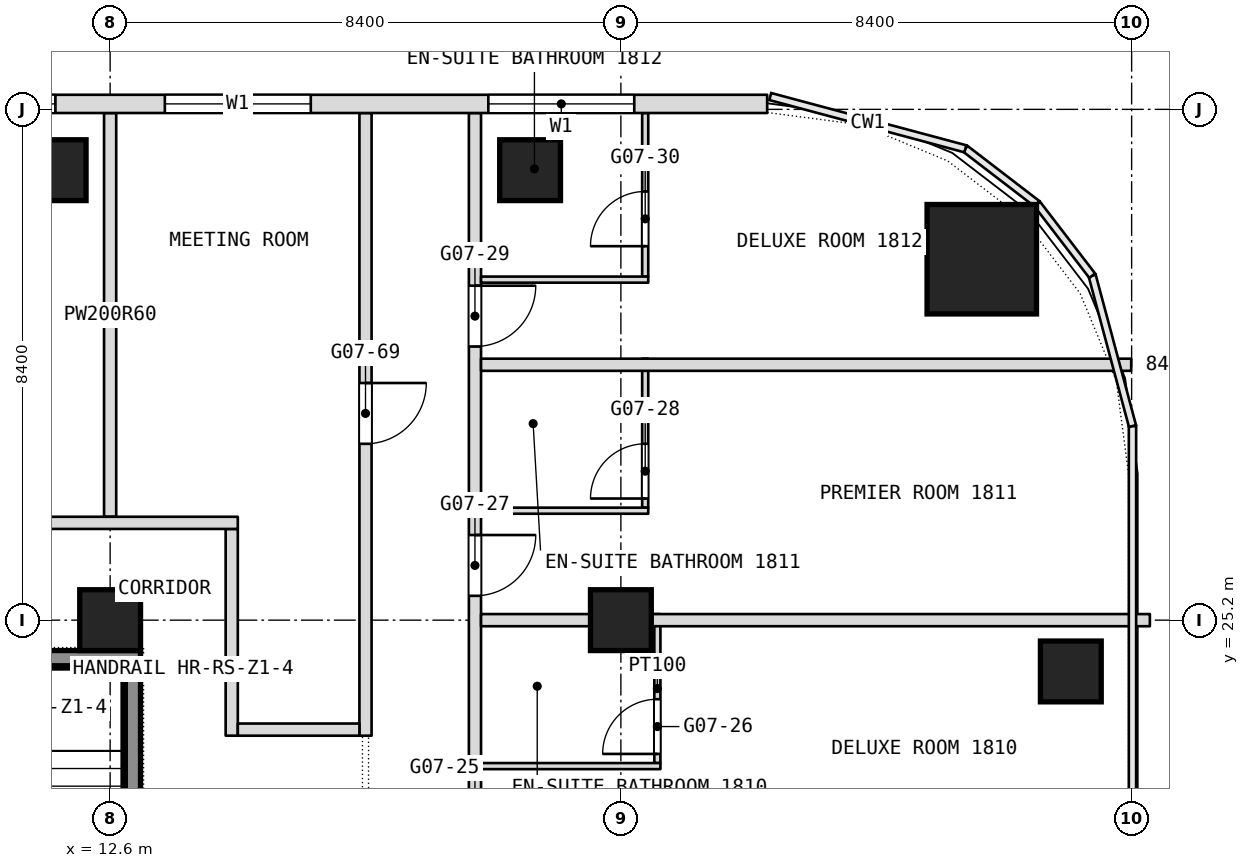
"""IFC4 building model, lengths in metres.
Left out: names, types, materials, properties, quantities, classifications, styles, units other than length and angle.
Written with IfcOpenShell. Run it as: python <this file> out.ifc"""

import sys

from ifc_helpers import new_model, si_unit, direction, frame, frame_2d, origin, origin_2d, place, context, subcontext, project, spatial, rectangle, extrude, element, fill, save


model = new_model("IFC4")
c1 = context("Model", 3, precision=1e-05, world=origin(), true_north=direction((0.0, 1.0)))
c2 = subcontext(c1, "Body", "Model", "MODEL_VIEW")
j1 = project(units=[si_unit("LENGTHUNIT", "METRE"), si_unit("PLANEANGLEUNIT", "RADIAN")], contexts=[c1])
p1 = place(None, origin())
s1 = spatial("IfcSite", under=j1, at=p1, CompositionType="ELEMENT")
p2 = place(p1, origin())
s2 = spatial("IfcBuilding", under=s1, at=p2, CompositionType="ELEMENT")
p3 = place(p2, frame((0.0, 0.0, 79.7)))
s3 = spatial("IfcBuildingStorey", under=s2, at=p3, CompositionType="ELEMENT", Elevation=79.7)
p4 = place(p3, frame((26.936, 31.135, 0.0), z_axis=(0.0, 0.0, 1.0), x_axis=(1.0, 0.0, 0.0)))
e1 = element("IfcColumn", 1, at=p4, inside=s3, PredefinedType="COLUMN", context=c2, shape_type="SweptSolid", body=[
    extrude(rectangle(XDim=1.8, YDim=1.8, at=origin_2d()), origin(), (0.0, 0.0, 1.0), 3.6),
])
for number, where, z_axis, x_axis in (
    (2, (12.6, 25.2, 0.0), (0.0, 0.0, 1.0), (1.0, 0.0, 0.0)),
    (3, (21.0, 25.2, 0.0), (0.0, 0.0, 1.0), (1.0, 0.0, 0.0)),
    (4, (11.704, 32.6, 0.0), (0.0, 0.0, 1.0), (1.0, 0.0, 0.0)),
    (5, (19.507, 32.6, 0.0), (0.0, 0.0, 1.0), (1.0, 0.0, 0.0)),
    (6, (28.4, 24.356, 0.0), (0.0, 0.0, 1.0), (1.0, 0.0, 0.0)),
):
    element("IfcColumn", number, at=place(p3, frame(where, z_axis=z_axis, x_axis=x_axis)), inside=s3, PredefinedType="COLUMN", context=c2, shape_type="SweptSolid", body=[
        extrude(rectangle(XDim=1.0, YDim=1.0, at=origin_2d()), origin(), (0.0, 0.0, 1.0), 3.6),
    ])
p5 = place(p3, frame((21.6, 22.85, 0.0), z_axis=(0.0, 0.0, 1.0), x_axis=(0.0, 1.0, 0.0)))
e7 = element("IfcWall", 7, at=p5, inside=s3, PredefinedType="PARTITIONING", context=c2, shape_type="SweptSolid", body=[
    extrude(rectangle(XDim=2.45, YDim=0.1, at=frame_2d((1.225, 0.0))), origin(), (0.0, 0.0, 1.0), 3.34),
])
p6 = place(p5, frame((0.15, 0.0, 0.0)))
e8 = element("IfcOpeningElement", 8, at=p6, cuts=e7, PredefinedType="OPENING", context=c2, shape_type="SweptSolid", body=[
    extrude(rectangle(XDim=0.9, YDim=2.1, at=frame_2d((0.45, 1.05))), frame((0.0, 0.05, 0.0), z_axis=(0.0, -1.0, 0.0), x_axis=(1.0, 0.0, 0.0)), (0.0, 0.0, 1.0), 0.1),
])
p7 = place(p3, frame((21.4, 27.05, 0.0), z_axis=(0.0, 0.0, 1.0), x_axis=(0.0, 1.0, 0.0)))
e9 = element("IfcWall", 9, at=p7, inside=s3, PredefinedType="PARTITIONING", context=c2, shape_type="SweptSolid", body=[
    extrude(rectangle(XDim=2.45, YDim=0.1, at=frame_2d((1.225, 0.0))), origin(), (0.0, 0.0, 1.0), 3.34),
])
p8 = place(p7, frame((0.15, 0.0, 0.0)))
e10 = element("IfcOpeningElement", 10, at=p8, cuts=e9, PredefinedType="OPENING", context=c2, shape_type="SweptSolid", body=[
    extrude(rectangle(XDim=0.9, YDim=2.1, at=frame_2d((0.45, 1.05))), frame((0.0, 0.05, 0.0), z_axis=(0.0, -1.0, 0.0), x_axis=(1.0, 0.0, 0.0)), (0.0, 0.0, 1.0), 0.1),
])
p9 = place(p3, frame((21.4, 30.85, 0.0), z_axis=(0.0, 0.0, 1.0), x_axis=(0.0, 1.0, 0.0)))
e11 = element("IfcWall", 11, at=p9, inside=s3, PredefinedType="PARTITIONING", context=c2, shape_type="SweptSolid", body=[
    extrude(rectangle(XDim=2.69, YDim=0.1, at=frame_2d((1.345, 0.0))), origin(), (0.0, 0.0, 1.0), 3.34),
])
p10 = place(p9, frame((0.5, 0.0, 0.0)))
e12 = element("IfcOpeningElement", 12, at=p10, cuts=e11, PredefinedType="OPENING", context=c2, shape_type="SweptSolid", body=[
    extrude(rectangle(XDim=0.9, YDim=2.1, at=frame_2d((0.45, 1.05))), frame((0.0, 0.05, 0.0), z_axis=(0.0, -1.0, 0.0), x_axis=(1.0, 0.0, 0.0)), (0.0, 0.0, 1.0), 0.1),
])
p11 = place(p3, frame((18.6, -16.665, 0.0), z_axis=(0.0, 0.0, 1.0), x_axis=(0.0, 1.0, 0.0)))
e13 = element("IfcWall", 13, at=p11, inside=s3, PredefinedType="PARTITIONING", context=c2, shape_type="SweptSolid", body=[
    extrude(rectangle(XDim=50.205, YDim=0.2, at=frame_2d((25.103, 0.0))), origin(), (0.0, 0.0, 1.0), 3.34),
])
p12 = place(p11, frame((2.991, 0.0, 0.0)))
e14 = element("IfcOpeningElement", 14, at=p12, cuts=e13, PredefinedType="OPENING", context=c2, shape_type="SweptSolid", body=[
    extrude(rectangle(XDim=1.0, YDim=2.1, at=frame_2d((0.5, 1.05))), frame((0.0, 0.1, 0.0), z_axis=(0.0, -1.0, 0.0), x_axis=(1.0, 0.0, 0.0)), (0.0, 0.0, 1.0), 0.2),
])
p13 = place(p11, frame((4.574, 0.0, 0.0)))
e15 = element("IfcOpeningElement", 15, at=p13, cuts=e13, PredefinedType="OPENING", context=c2, shape_type="SweptSolid", body=[
    extrude(rectangle(XDim=1.0, YDim=2.1, at=frame_2d((0.5, 1.05))), frame((0.0, 0.1, 0.0), z_axis=(0.0, -1.0, 0.0), x_axis=(1.0, 0.0, 0.0)), (0.0, 0.0, 1.0), 0.2),
])
p14 = place(p11, frame((8.665, 0.0, 0.0)))
e16 = element("IfcOpeningElement", 16, at=p14, cuts=e13, PredefinedType="OPENING", context=c2, shape_type="SweptSolid", body=[
    extrude(rectangle(XDim=1.0, YDim=2.1, at=frame_2d((0.5, 1.05))), frame((0.0, 0.1, 0.0), z_axis=(0.0, -1.0, 0.0), x_axis=(1.0, 0.0, 0.0)), (0.0, 0.0, 1.0), 0.2),
])
p15 = place(p11, frame((15.265, 0.0, 0.0)))
e17 = element("IfcOpeningElement", 17, at=p15, cuts=e13, PredefinedType="OPENING", context=c2, shape_type="SweptSolid", body=[
    extrude(rectangle(XDim=1.0, YDim=2.1, at=frame_2d((0.5, 1.05))), frame((0.0, 0.1, 0.0), z_axis=(0.0, -1.0, 0.0), x_axis=(1.0, 0.0, 0.0)), (0.0, 0.0, 1.0), 0.2),
])
p16 = place(p11, frame((19.465, 0.0, 0.0)))
e18 = element("IfcOpeningElement", 18, at=p16, cuts=e13, PredefinedType="OPENING", context=c2, shape_type="SweptSolid", body=[
    extrude(rectangle(XDim=1.0, YDim=2.1, at=frame_2d((0.5, 1.05))), frame((0.0, 0.1, 0.0), z_axis=(0.0, -1.0, 0.0), x_axis=(1.0, 0.0, 0.0)), (0.0, 0.0, 1.0), 0.2),
])
p17 = place(p11, frame((21.265, 0.0, 0.0)))
e19 = element("IfcOpeningElement", 19, at=p17, cuts=e13, PredefinedType="OPENING", context=c2, shape_type="SweptSolid", body=[
    extrude(rectangle(XDim=1.0, YDim=2.1, at=frame_2d((0.5, 1.05))), frame((0.0, 0.1, 0.0), z_axis=(0.0, -1.0, 0.0), x_axis=(1.0, 0.0, 0.0)), (0.0, 0.0, 1.0), 0.2),
])
p18 = place(p11, frame((25.465, 0.0, 0.0)))
e20 = element("IfcOpeningElement", 20, at=p18, cuts=e13, PredefinedType="OPENING", context=c2, shape_type="SweptSolid", body=[
    extrude(rectangle(XDim=1.0, YDim=2.1, at=frame_2d((0.5, 1.05))), frame((0.0, 0.1, 0.0), z_axis=(0.0, -1.0, 0.0), x_axis=(1.0, 0.0, 0.0)), (0.0, 0.0, 1.0), 0.2),
])
p19 = place(p11, frame((32.065, 0.0, 0.0)))
e21 = element("IfcOpeningElement", 21, at=p19, cuts=e13, PredefinedType="OPENING", context=c2, shape_type="SweptSolid", body=[
    extrude(rectangle(XDim=1.0, YDim=2.1, at=frame_2d((0.5, 1.05))), frame((0.0, 0.1, 0.0), z_axis=(0.0, -1.0, 0.0), x_axis=(1.0, 0.0, 0.0)), (0.0, 0.0, 1.0), 0.2),
])
p20 = place(p11, frame((36.265, 0.0, 0.0)))
e22 = element("IfcOpeningElement", 22, at=p20, cuts=e13, PredefinedType="OPENING", context=c2, shape_type="SweptSolid", body=[
    extrude(rectangle(XDim=1.0, YDim=2.1, at=frame_2d((0.5, 1.05))), frame((0.0, 0.1, 0.0), z_axis=(0.0, -1.0, 0.0), x_axis=(1.0, 0.0, 0.0)), (0.0, 0.0, 1.0), 0.2),
])
p21 = place(p11, frame((38.065, 0.0, 0.0)))
e23 = element("IfcOpeningElement", 23, at=p21, cuts=e13, PredefinedType="OPENING", context=c2, shape_type="SweptSolid", body=[
    extrude(rectangle(XDim=1.0, YDim=2.1, at=frame_2d((0.5, 1.05))), frame((0.0, 0.1, 0.0), z_axis=(0.0, -1.0, 0.0), x_axis=(1.0, 0.0, 0.0)), (0.0, 0.0, 1.0), 0.2),
])
p22 = place(p11, frame((42.265, 0.0, 0.0)))
e24 = element("IfcOpeningElement", 24, at=p22, cuts=e13, PredefinedType="OPENING", context=c2, shape_type="SweptSolid", body=[
    extrude(rectangle(XDim=1.0, YDim=2.1, at=frame_2d((0.5, 1.05))), frame((0.0, 0.1, 0.0), z_axis=(0.0, -1.0, 0.0), x_axis=(1.0, 0.0, 0.0)), (0.0, 0.0, 1.0), 0.2),
])
p23 = place(p11, frame((46.365, 0.0, 0.0)))
e25 = element("IfcOpeningElement", 25, at=p23, cuts=e13, PredefinedType="OPENING", context=c2, shape_type="SweptSolid", body=[
    extrude(rectangle(XDim=1.0, YDim=2.1, at=frame_2d((0.5, 1.05))), frame((0.0, 0.1, 0.0), z_axis=(0.0, -1.0, 0.0), x_axis=(1.0, 0.0, 0.0)), (0.0, 0.0, 1.0), 0.2),
])
p24 = place(p3, frame((16.8, 23.3, 0.0), z_axis=(0.0, 0.0, 1.0), x_axis=(0.0, 1.0, 0.0)))
e26 = element("IfcWall", 26, at=p24, inside=s3, PredefinedType="PARTITIONING", context=c2, shape_type="SweptSolid", body=[
    extrude(rectangle(XDim=10.24, YDim=0.2, at=frame_2d((5.12, 0.0))), origin(), (0.0, 0.0, 1.0), 3.34),
])
p25 = place(p24, frame((4.8, 0.0, 0.0)))
e27 = element("IfcOpeningElement", 27, at=p25, cuts=e26, PredefinedType="OPENING", context=c2, shape_type="SweptSolid", body=[
    extrude(rectangle(XDim=1.0, YDim=2.1, at=frame_2d((0.5, 1.05))), frame((0.0, 0.1, 0.0), z_axis=(0.0, -1.0, 0.0), x_axis=(1.0, 0.0, 0.0)), (0.0, 0.0, 1.0), 0.2),
])
p26 = place(p3, frame((14.6, 23.3, 0.0), z_axis=(0.0, 0.0, 1.0), x_axis=(0.0, 1.0, 0.0)))
e28 = element("IfcWall", 28, at=p26, inside=s3, PredefinedType="PARTITIONING", context=c2, shape_type="SweptSolid", body=[
    extrude(rectangle(XDim=3.4, YDim=0.2, at=frame_2d((1.7, 0.0))), origin(), (0.0, 0.0, 1.0), 3.34),
])
p27 = place(p3, frame((12.6, 26.9, 0.0), z_axis=(0.0, 0.0, 1.0), x_axis=(0.0, 1.0, 0.0)))
e29 = element("IfcWall", 29, at=p27, inside=s3, PredefinedType="PARTITIONING", context=c2, shape_type="SweptSolid", body=[
    extrude(rectangle(XDim=6.64, YDim=0.2, at=frame_2d((3.32, 0.0))), origin(), (0.0, 0.0, 1.0), 3.34),
])
p28 = place(p3, frame((18.7, 22.8, 0.0), z_axis=(0.0, 0.0, 1.0), x_axis=(1.0, 0.0, 0.0)))
e30 = element("IfcWall", 30, at=p28, inside=s3, PredefinedType="PARTITIONING", context=c2, shape_type="SweptSolid", body=[
    extrude(rectangle(XDim=2.95, YDim=0.1, at=frame_2d((1.475, 0.0))), origin(), (0.0, 0.0, 1.0), 3.34),
])
p29 = place(p3, frame((14.7, 23.4, 0.0), z_axis=(0.0, 0.0, 1.0), x_axis=(1.0, 0.0, 0.0)))
e31 = element("IfcWall", 31, at=p29, inside=s3, PredefinedType="PARTITIONING", context=c2, shape_type="SweptSolid", body=[
    extrude(rectangle(XDim=2.0, YDim=0.2, at=frame_2d((1.0, 0.0))), origin(), (0.0, 0.0, 1.0), 3.34),
])
p30 = place(p3, frame((18.7, 25.2, 0.0), z_axis=(0.0, 0.0, 1.0), x_axis=(1.0, 0.0, 0.0)))
e32 = element("IfcWall", 32, at=p30, inside=s3, PredefinedType="PARTITIONING", context=c2, shape_type="SweptSolid", body=[
    extrude(rectangle(XDim=11.0, YDim=0.2, at=frame_2d((5.5, 0.0))), origin(), (0.0, 0.0, 1.0), 2.84),
])
p31 = place(p3, frame((6.7, 26.8, 0.0), z_axis=(0.0, 0.0, 1.0), x_axis=(1.0, 0.0, 0.0)))
e33 = element("IfcWall", 33, at=p31, inside=s3, PredefinedType="PARTITIONING", context=c2, shape_type="SweptSolid", body=[
    extrude(rectangle(XDim=8.0, YDim=0.2, at=frame_2d((4.0, 0.0))), origin(), (0.0, 0.0, 1.0), 3.34),
])
p32 = place(p3, frame((18.7, 27.0, 0.0), z_axis=(0.0, 0.0, 1.0), x_axis=(1.0, 0.0, 0.0)))
e34 = element("IfcWall", 34, at=p32, inside=s3, PredefinedType="PARTITIONING", context=c2, shape_type="SweptSolid", body=[
    extrude(rectangle(XDim=2.75, YDim=0.1, at=frame_2d((1.375, 0.0))), origin(), (0.0, 0.0, 1.0), 3.34),
])
p33 = place(p3, frame((18.7, 29.4, 0.0), z_axis=(0.0, 0.0, 1.0), x_axis=(1.0, 0.0, 0.0)))
e35 = element("IfcWall", 35, at=p33, inside=s3, PredefinedType="PARTITIONING", context=c2, shape_type="SweptSolid", body=[
    extrude(rectangle(XDim=10.693, YDim=0.2, at=frame_2d((5.347, 0.0))), origin(), (0.0, 0.0, 1.0), 3.34),
])
p34 = place(p3, frame((18.7, 30.8, 0.0), z_axis=(0.0, 0.0, 1.0), x_axis=(1.0, 0.0, 0.0)))
e36 = element("IfcWall", 36, at=p34, inside=s3, PredefinedType="PARTITIONING", context=c2, shape_type="SweptSolid", body=[
    extrude(rectangle(XDim=2.75, YDim=0.1, at=frame_2d((1.375, 0.0))), origin(), (0.0, 0.0, 1.0), 3.34),
])
p35 = place(p3, frame((23.406, 33.69, 0.0), z_axis=(0.0, 0.0, 1.0), x_axis=(-1.0, 0.0, 0.0)))
e37 = element("IfcWall", 37, at=p35, inside=s3, PredefinedType="NOTDEFINED", context=c2, shape_type="SweptSolid", body=[
    extrude(rectangle(XDim=46.812, YDim=0.3, at=frame_2d((23.406, 0.0))), origin(), (0.0, 0.0, 1.0), 3.6),
])
p36 = place(p35, frame((2.186, 0.0, 0.9)))
e38 = element("IfcOpeningElement", 38, at=p36, cuts=e37, PredefinedType="OPENING", context=c2, shape_type="SweptSolid", body=[
    extrude(rectangle(XDim=2.4, YDim=2.1, at=frame_2d((1.2, 1.05))), frame((0.0, 0.15, 0.0), z_axis=(0.0, -1.0, 0.0), x_axis=(1.0, 0.0, 0.0)), (0.0, 0.0, 1.0), 0.3),
])
p37 = place(p35, frame((7.506, 0.0, 0.9)))
e39 = element("IfcOpeningElement", 39, at=p37, cuts=e37, PredefinedType="OPENING", context=c2, shape_type="SweptSolid", body=[
    extrude(rectangle(XDim=2.4, YDim=2.1, at=frame_2d((1.2, 1.05))), frame((0.0, 0.15, 0.0), z_axis=(0.0, -1.0, 0.0), x_axis=(1.0, 0.0, 0.0)), (0.0, 0.0, 1.0), 0.3),
])
p38 = place(p35, frame((11.706, 0.0, 0.9)))
e40 = element("IfcOpeningElement", 40, at=p38, cuts=e37, PredefinedType="OPENING", context=c2, shape_type="SweptSolid", body=[
    extrude(rectangle(XDim=2.4, YDim=2.1, at=frame_2d((1.2, 1.05))), frame((0.0, 0.15, 0.0), z_axis=(0.0, -1.0, 0.0), x_axis=(1.0, 0.0, 0.0)), (0.0, 0.0, 1.0), 0.3),
])
p39 = place(p35, frame((15.906, 0.0, 0.9)))
e41 = element("IfcOpeningElement", 41, at=p39, cuts=e37, PredefinedType="OPENING", context=c2, shape_type="SweptSolid", body=[
    extrude(rectangle(XDim=2.4, YDim=2.1, at=frame_2d((1.2, 1.05))), frame((0.0, 0.15, 0.0), z_axis=(0.0, -1.0, 0.0), x_axis=(1.0, 0.0, 0.0)), (0.0, 0.0, 1.0), 0.3),
])
p40 = place(p35, frame((20.106, 0.0, 0.9)))
e42 = element("IfcOpeningElement", 42, at=p40, cuts=e37, PredefinedType="OPENING", context=c2, shape_type="SweptSolid", body=[
    extrude(rectangle(XDim=2.4, YDim=2.1, at=frame_2d((1.2, 1.05))), frame((0.0, 0.15, 0.0), z_axis=(0.0, -1.0, 0.0), x_axis=(1.0, 0.0, 0.0)), (0.0, 0.0, 1.0), 0.3),
])
p41 = place(p35, frame((24.306, 0.0, 0.9)))
e43 = element("IfcOpeningElement", 43, at=p41, cuts=e37, PredefinedType="OPENING", context=c2, shape_type="SweptSolid", body=[
    extrude(rectangle(XDim=2.4, YDim=2.1, at=frame_2d((1.2, 1.05))), frame((0.0, 0.15, 0.0), z_axis=(0.0, -1.0, 0.0), x_axis=(1.0, 0.0, 0.0)), (0.0, 0.0, 1.0), 0.3),
])
p42 = place(p35, frame((28.506, 0.0, 0.9)))
e44 = element("IfcOpeningElement", 44, at=p42, cuts=e37, PredefinedType="OPENING", context=c2, shape_type="SweptSolid", body=[
    extrude(rectangle(XDim=2.4, YDim=2.1, at=frame_2d((1.2, 1.05))), frame((0.0, 0.15, 0.0), z_axis=(0.0, -1.0, 0.0), x_axis=(1.0, 0.0, 0.0)), (0.0, 0.0, 1.0), 0.3),
])
p43 = place(p35, frame((32.706, 0.0, 0.9)))
e45 = element("IfcOpeningElement", 45, at=p43, cuts=e37, PredefinedType="OPENING", context=c2, shape_type="SweptSolid", body=[
    extrude(rectangle(XDim=2.4, YDim=2.1, at=frame_2d((1.2, 1.05))), frame((0.0, 0.15, 0.0), z_axis=(0.0, -1.0, 0.0), x_axis=(1.0, 0.0, 0.0)), (0.0, 0.0, 1.0), 0.3),
])
p44 = place(p35, frame((36.906, 0.0, 0.9)))
e46 = element("IfcOpeningElement", 46, at=p44, cuts=e37, PredefinedType="OPENING", context=c2, shape_type="SweptSolid", body=[
    extrude(rectangle(XDim=2.4, YDim=2.1, at=frame_2d((1.2, 1.05))), frame((0.0, 0.15, 0.0), z_axis=(0.0, -1.0, 0.0), x_axis=(1.0, 0.0, 0.0)), (0.0, 0.0, 1.0), 0.3),
])
p45 = place(p35, frame((42.226, 0.0, 0.9)))
e47 = element("IfcOpeningElement", 47, at=p45, cuts=e37, PredefinedType="OPENING", context=c2, shape_type="SweptSolid", body=[
    extrude(rectangle(XDim=2.4, YDim=2.1, at=frame_2d((1.2, 1.05))), frame((0.0, 0.15, 0.0), z_axis=(0.0, -1.0, 0.0), x_axis=(1.0, 0.0, 0.0)), (0.0, 0.0, 1.0), 0.3),
])
p46 = place(p3, frame((9.7, 24.575, 0.1), z_axis=(0.0, 0.0, 1.0), x_axis=(1.0, 0.0, 0.0)))
e48 = element("IfcWall", 48, at=p46, inside=s3, PredefinedType="SHEAR", context=c2, shape_type="SweptSolid", body=[
    extrude(rectangle(XDim=3.4, YDim=0.25, at=frame_2d((1.7, 0.0))), origin(), (0.0, 0.0, 1.0), 3.6),
])
p47 = place(p3, frame((12.975, 18.75, 0.1), z_axis=(0.0, 0.0, 1.0), x_axis=(0.0, 1.0, 0.0)))
e49 = element("IfcWall", 49, at=p47, inside=s3, PredefinedType="SHEAR", context=c2, shape_type="SweptSolid", body=[
    extrude(rectangle(XDim=5.7, YDim=0.25, at=frame_2d((2.85, 0.0))), origin(), (0.0, 0.0, 1.0), 3.6),
])
p48 = place(p6, origin())
e50 = element("IfcDoor", 50, at=p48, inside=s3, OperationType="SINGLE_SWING_LEFT", PredefinedType="DOOR", context=c2, shape_type="SweptSolid", body=[
    extrude(rectangle(XDim=0.9, YDim=2.1, at=frame_2d((0.45, 1.05))), frame((0.0, 0.025, 0.0), z_axis=(0.0, -1.0, 0.0), x_axis=(1.0, 0.0, 0.0)), (0.0, 0.0, 1.0), 0.05),
])
fill(e8, e50)
p49 = place(p8, origin())
e51 = element("IfcDoor", 51, at=p49, inside=s3, OperationType="SINGLE_SWING_LEFT", PredefinedType="DOOR", context=c2, shape_type="SweptSolid", body=[
    extrude(rectangle(XDim=0.9, YDim=2.1, at=frame_2d((0.45, 1.05))), frame((0.0, 0.025, 0.0), z_axis=(0.0, -1.0, 0.0), x_axis=(1.0, 0.0, 0.0)), (0.0, 0.0, 1.0), 0.05),
])
fill(e10, e51)
p50 = place(p10, origin())
e52 = element("IfcDoor", 52, at=p50, inside=s3, OperationType="SINGLE_SWING_LEFT", PredefinedType="DOOR", context=c2, shape_type="SweptSolid", body=[
    extrude(rectangle(XDim=0.9, YDim=2.1, at=frame_2d((0.45, 1.05))), frame((0.0, 0.025, 0.0), z_axis=(0.0, -1.0, 0.0), x_axis=(1.0, 0.0, 0.0)), (0.0, 0.0, 1.0), 0.05),
])
fill(e12, e52)
p51 = place(p22, origin())
e53 = element("IfcDoor", 53, at=p51, inside=s3, OperationType="SINGLE_SWING_LEFT", PredefinedType="DOOR", context=c2, shape_type="SweptSolid", body=[
    extrude(rectangle(XDim=1.0, YDim=2.1, at=frame_2d((0.5, 1.05))), frame((0.0, 0.025, 0.0), z_axis=(0.0, -1.0, 0.0), x_axis=(1.0, 0.0, 0.0)), (0.0, 0.0, 1.0), 0.05),
])
fill(e24, e53)
p52 = place(p23, origin())
e54 = element("IfcDoor", 54, at=p52, inside=s3, OperationType="SINGLE_SWING_LEFT", PredefinedType="DOOR", context=c2, shape_type="SweptSolid", body=[
    extrude(rectangle(XDim=1.0, YDim=2.1, at=frame_2d((0.5, 1.05))), frame((0.0, 0.025, 0.0), z_axis=(0.0, -1.0, 0.0), x_axis=(1.0, 0.0, 0.0)), (0.0, 0.0, 1.0), 0.05),
])
fill(e25, e54)
p53 = place(p25, origin())
e55 = element("IfcDoor", 55, at=p53, inside=s3, OperationType="SINGLE_SWING_LEFT", PredefinedType="DOOR", context=c2, shape_type="SweptSolid", body=[
    extrude(rectangle(XDim=1.0, YDim=2.1, at=frame_2d((0.5, 1.05))), frame((0.0, 0.025, 0.0), z_axis=(0.0, -1.0, 0.0), x_axis=(1.0, 0.0, 0.0)), (0.0, 0.0, 1.0), 0.05),
])
fill(e27, e55)
p54 = place(p36, origin())
e56 = element("IfcWindow", 56, at=p54, inside=s3, PartitioningType="SINGLE_PANEL", PredefinedType="WINDOW", context=c2, shape_type="SweptSolid", body=[
    extrude(rectangle(XDim=2.4, YDim=2.1, at=frame_2d((1.2, 1.05))), frame((0.0, 0.03, 0.0), z_axis=(0.0, -1.0, 0.0), x_axis=(1.0, 0.0, 0.0)), (0.0, 0.0, 1.0), 0.06),
])
fill(e38, e56)
p55 = place(p37, origin())
e57 = element("IfcWindow", 57, at=p55, inside=s3, PartitioningType="SINGLE_PANEL", PredefinedType="WINDOW", context=c2, shape_type="SweptSolid", body=[
    extrude(rectangle(XDim=2.4, YDim=2.1, at=frame_2d((1.2, 1.05))), frame((0.0, 0.03, 0.0), z_axis=(0.0, -1.0, 0.0), x_axis=(1.0, 0.0, 0.0)), (0.0, 0.0, 1.0), 0.06),
])
fill(e39, e57)
p56 = place(p38, origin())
e58 = element("IfcWindow", 58, at=p56, inside=s3, PartitioningType="SINGLE_PANEL", PredefinedType="WINDOW", context=c2, shape_type="SweptSolid", body=[
    extrude(rectangle(XDim=2.4, YDim=2.1, at=frame_2d((1.2, 1.05))), frame((0.0, 0.03, 0.0), z_axis=(0.0, -1.0, 0.0), x_axis=(1.0, 0.0, 0.0)), (0.0, 0.0, 1.0), 0.06),
])
fill(e40, e58)
save(model, sys.argv[1])
